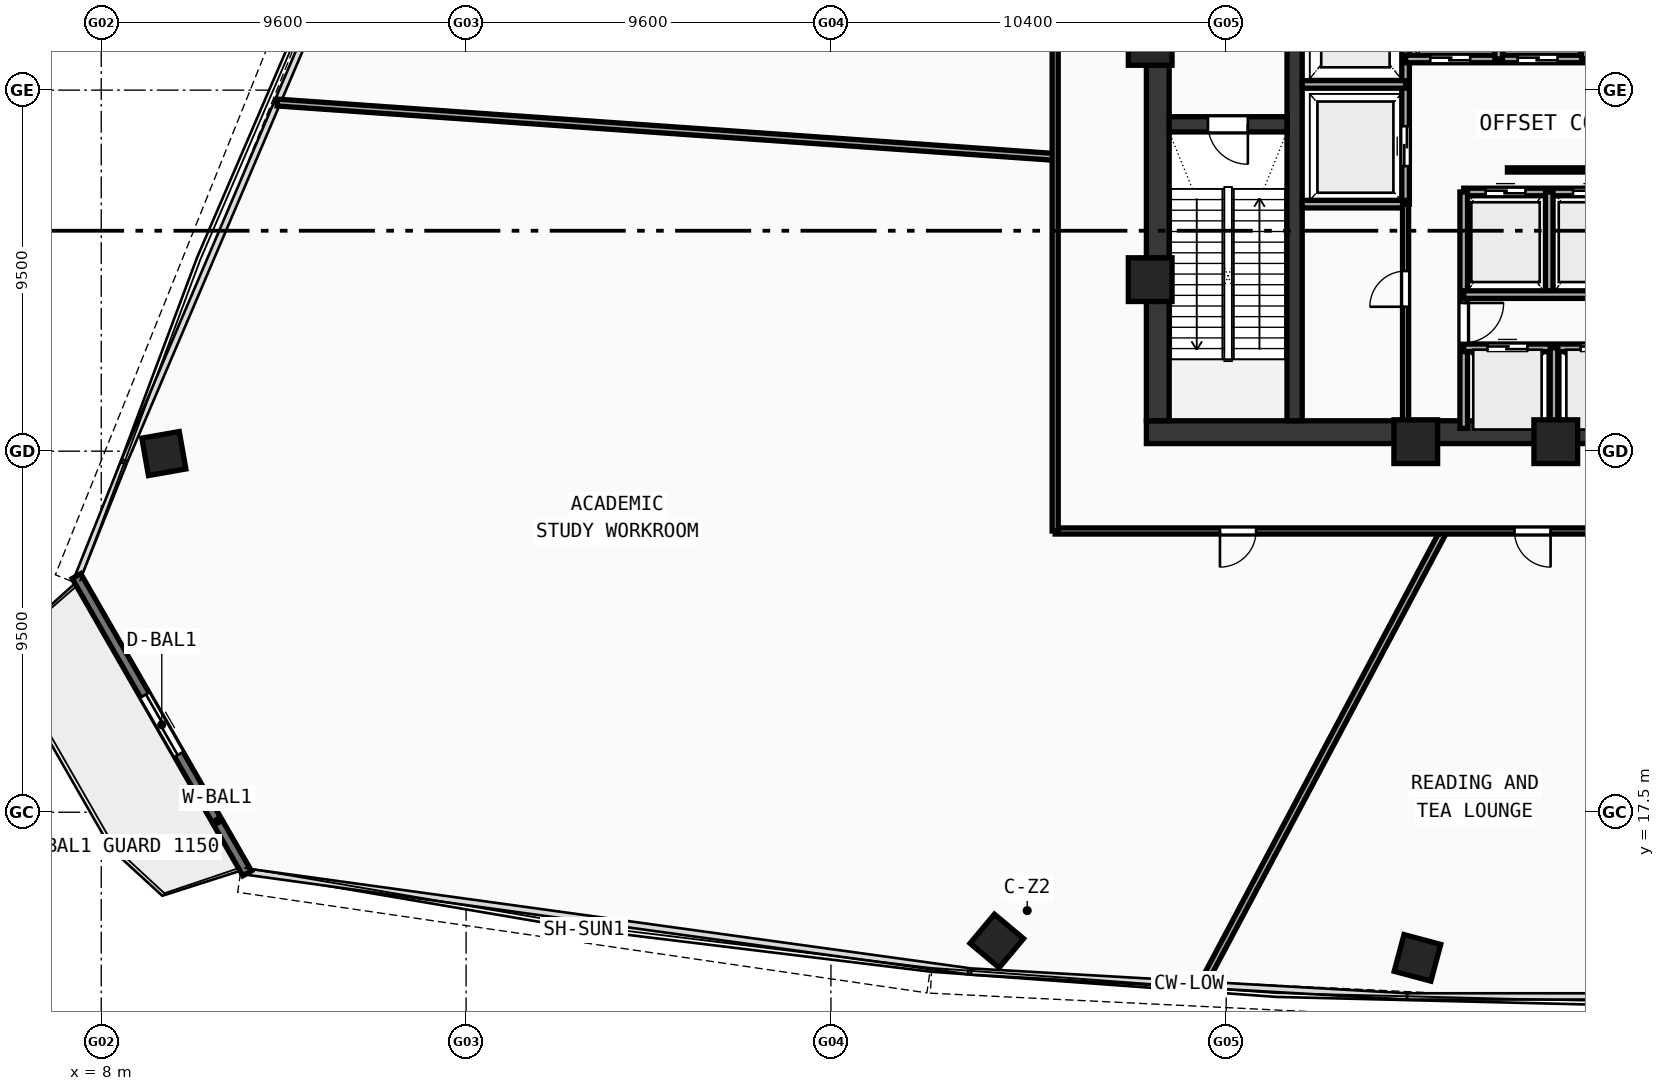
"""IFC4 building model, lengths in metres.
Left out: names, types, materials, properties, quantities, classifications, styles, units other than length and angle.
Written with IfcOpenShell. Run it as: python <this file> out.ifc"""

import sys

from ifc_helpers import new_model, si_unit, direction, frame, frame_2d, origin, origin_with_axes, origin_2d, place, context, subcontext, project, spatial, rectangle, hollow_rectangle, extrude, source, transform, mapped, element, fill, save


model = new_model("IFC4")
c1 = context("Model", 3, precision=1e-05, world=origin(), true_north=direction((0.0, 1.0)))
c2 = subcontext(c1, "Body", "Model", "MODEL_VIEW")
j1 = project(units=[si_unit("LENGTHUNIT", "METRE"), si_unit("PLANEANGLEUNIT", "RADIAN")], contexts=[c1])
p1 = place(None, origin())
s1 = spatial("IfcSite", under=j1, at=p1, CompositionType="ELEMENT")
p2 = place(p1, origin())
s2 = spatial("IfcBuilding", under=s1, at=p2, CompositionType="ELEMENT")
p3 = place(p2, frame((0.0, 0.0, 119.18)))
s3 = spatial("IfcBuildingStorey", under=s2, at=p3, CompositionType="ELEMENT", Elevation=119.18)
p4 = place(p3, frame((35.5, 27.5, 0.0), z_axis=(0.0, 0.0, 1.0), x_axis=(1.0, 0.0, 0.0)))
e1 = element("IfcWall", 1, at=p4, inside=s3, PredefinedType="SHEAR", context=c2, shape_type="SweptSolid", body=[
    extrude(rectangle(XDim=25.0, YDim=0.6, at=frame_2d((12.5, 0.0))), origin(), (0.0, 0.0, 1.0), 5.57),
])
p5 = place(p3, frame((35.8, 27.8, 0.0), z_axis=(0.0, 0.0, 1.0), x_axis=(0.0, 1.0, 0.0)))
e2 = element("IfcWall", 2, at=p5, inside=s3, PredefinedType="SHEAR", context=c2, shape_type="SweptSolid", body=[
    extrude(rectangle(XDim=12.1, YDim=0.6, at=frame_2d((6.05, 0.0))), origin(), (0.0, 0.0, 1.0), 5.57),
])
p6 = place(p3, frame((39.4, 27.8, 0.0), z_axis=(0.0, 0.0, 1.0), x_axis=(0.0, 1.0, 0.0)))
e3 = element("IfcWall", 3, at=p6, inside=s3, PredefinedType="SHEAR", context=c2, shape_type="SweptSolid", body=[
    extrude(rectangle(XDim=12.1, YDim=0.4, at=frame_2d((6.05, 0.0))), origin(), (0.0, 0.0, 1.0), 5.57),
])
p7 = place(p6, frame((9.95, 0.0, 0.0)))
e4 = element("IfcOpeningElement", 4, at=p7, cuts=e3, PredefinedType="OPENING", context=c2, shape_type="SweptSolid", body=[
    extrude(rectangle(XDim=1.1, YDim=2.1, at=frame_2d((0.55, 1.05))), frame((0.0, 0.21, 0.0), z_axis=(0.0, -1.0, 0.0), x_axis=(1.0, 0.0, 0.0)), (0.0, 0.0, 1.0), 0.42),
])
p8 = place(p3, frame((36.1, 35.6, 0.0), z_axis=(0.0, 0.0, 1.0), x_axis=(1.0, 0.0, 0.0)))
e5 = element("IfcWall", 5, at=p8, inside=s3, PredefinedType="SHEAR", context=c2, shape_type="SweptSolid", body=[
    extrude(rectangle(XDim=3.1, YDim=0.4, at=frame_2d((1.55, 0.0))), origin(), (0.0, 0.0, 1.0), 5.57),
])
p9 = place(p8, frame((1.02, 0.0, 0.0)))
e6 = element("IfcOpeningElement", 6, at=p9, cuts=e5, PredefinedType="OPENING", context=c2, shape_type="SweptSolid", body=[
    extrude(rectangle(XDim=1.05, YDim=2.1, at=frame_2d((0.525, 1.05))), frame((0.0, 0.21, 0.0), z_axis=(0.0, -1.0, 0.0), x_axis=(1.0, 0.0, 0.0)), (0.0, 0.0, 1.0), 0.42),
])
m1 = source(origin(), c2, "Body", "SweptSolid", [
    extrude(hollow_rectangle(XDim=1.15, YDim=1.15, WallThickness=0.048, at=origin_2d()), origin(), (0.0, 0.0, 1.0), 5.85),
])
for number, where, z_axis, x_axis in (
    (7, (42.588, 27.25, -0.28), (0.0, 0.0, 1.0), (1.0, 0.0, 0.0)),
    (8, (46.272, 27.25, -0.28), (0.0, 0.0, 1.0), (1.0, 0.0, 0.0)),
    (9, (35.6, 37.729, -0.28), (0.0, 0.0, 1.0), (1.0, 0.0, 0.0)),
    (10, (35.6, 31.513, -0.28), (0.0, 0.0, 1.0), (1.0, 0.0, 0.0)),
):
    element("IfcColumn", number, at=place(p3, frame(where, z_axis=z_axis, x_axis=x_axis)), inside=s3, PredefinedType="COLUMN", context=c2, shape_type="MappedRepresentation", body=[
        mapped(m1, transform((0.0, 0.0, 0.0), scale=1.0)),
    ])
m2 = source(origin(), c2, "Body", "SweptSolid", [
    extrude(hollow_rectangle(XDim=1.0, YDim=1.0, WallThickness=0.042, at=origin_2d()), origin(), (0.0, 0.0, 1.0), 5.85),
])
for number, where, z_axis, x_axis in (
    (11, (31.564, 14.112, -0.28), (0.0, 0.0, 1.0), (0.766, -0.643, 0.0)),
    (12, (42.633, 13.668, -0.28), (0.0, 0.0, 1.0), (0.966, -0.259, 0.0)),
    (13, (9.647, 26.938, -0.28), (0.0, 0.0, 1.0), (0.174, -0.985, 0.0)),
):
    element("IfcColumn", number, at=place(p3, frame(where, z_axis=z_axis, x_axis=x_axis)), inside=s3, PredefinedType="COLUMN", context=c2, shape_type="MappedRepresentation", body=[
        mapped(m2, transform((0.0, 0.0, 0.0), scale=1.0)),
    ])
p10 = place(p3, frame((7.347, 23.714, 0.0), z_axis=(0.0, 0.0, 1.0), x_axis=(0.497936512869, -0.867213485338, 0.0)))
e14 = element("IfcWall", 14, at=p10, inside=s3, PredefinedType="STANDARD", context=c2, shape_type="SweptSolid", body=[
    extrude(rectangle(XDim=9.019, YDim=0.26, at=frame_2d((4.51, 0.0))), origin(), (0.0, 0.0, 1.0), 5.57),
])
p11 = place(p10, frame((3.61, 0.0, 0.0)))
e15 = element("IfcOpeningElement", 15, at=p11, cuts=e14, PredefinedType="OPENING", context=c2, shape_type="SweptSolid", body=[
    extrude(rectangle(XDim=1.8, YDim=2.15, at=frame_2d((0.9, 1.075))), frame((0.0, 0.14, 0.0), z_axis=(0.0, -1.0, 0.0), x_axis=(1.0, 0.0, 0.0)), (0.0, 0.0, 1.0), 0.28),
])
p12 = place(p3, frame((42.32, 33.5, 0.0), z_axis=(0.0, 0.0, 1.0), x_axis=(0.0, 1.0, 0.0)))
e16 = element("IfcWall", 16, at=p12, inside=s3, PredefinedType="SOLIDWALL", context=c2, shape_type="SweptSolid", body=[
    extrude(rectangle(XDim=6.45, YDim=0.2, at=frame_2d((3.225, 0.0))), origin(), (0.0, 0.0, 1.0), 5.57),
])
p13 = place(p12, frame((1.0, 0.0, 0.0)))
e17 = element("IfcOpeningElement", 17, at=p13, cuts=e16, PredefinedType="OPENING", context=c2, shape_type="SweptSolid", body=[
    extrude(rectangle(XDim=1.05, YDim=2.1, at=frame_2d((0.525, 1.05))), frame((0.0, 0.11, 0.0), z_axis=(0.0, -1.0, 0.0), x_axis=(1.0, 0.0, 0.0)), (0.0, 0.0, 1.0), 0.22),
])
for number, where, z_axis, x_axis in (
    (18, (39.6, 36.65, 0.0), (0.0, 0.0, 1.0), (1.0, 0.0, 0.0)),
    (19, (39.6, 33.5, 0.0), (0.0, 0.0, 1.0), (1.0, 0.0, 0.0)),
):
    element("IfcWall", number, at=place(p3, frame(where, z_axis=z_axis, x_axis=x_axis)), inside=s3, PredefinedType="SOLIDWALL", context=c2, shape_type="SweptSolid", body=[
        extrude(rectangle(XDim=2.72, YDim=0.2, at=frame_2d((1.36, 0.0))), origin(), (0.0, 0.0, 1.0), 5.57),
    ])
p14 = place(p3, frame((42.32, 37.32, 0.0), z_axis=(0.0, 0.0, 1.0), x_axis=(1.0, 0.0, 0.0)))
e20 = element("IfcWall", 20, at=p14, inside=s3, PredefinedType="SOLIDWALL", context=c2, shape_type="SweptSolid", body=[
    extrude(rectangle(XDim=4.73, YDim=0.2, at=frame_2d((2.365, 0.0))), origin(), (0.0, 0.0, 1.0), 5.57),
])
p15 = place(p14, frame((0.65, 0.0, 0.0)))
e21 = element("IfcOpeningElement", 21, at=p15, cuts=e20, PredefinedType="OPENING", context=c2, shape_type="SweptSolid", body=[
    extrude(rectangle(XDim=1.05, YDim=2.1, at=frame_2d((0.525, 1.05))), frame((0.0, 0.11, 0.0), z_axis=(0.0, -1.0, 0.0), x_axis=(1.0, 0.0, 0.0)), (0.0, 0.0, 1.0), 0.22),
])
p16 = place(p14, frame((2.95, 0.0, 0.0)))
e22 = element("IfcOpeningElement", 22, at=p16, cuts=e20, PredefinedType="OPENING", context=c2, shape_type="SweptSolid", body=[
    extrude(rectangle(XDim=1.05, YDim=2.1, at=frame_2d((0.525, 1.05))), frame((0.0, 0.11, 0.0), z_axis=(0.0, -1.0, 0.0), x_axis=(1.0, 0.0, 0.0)), (0.0, 0.0, 1.0), 0.22),
])
p17 = place(p3, frame((47.05, 37.32, 0.0), z_axis=(0.0, 0.0, 1.0), x_axis=(0.0, 1.0, 0.0)))
e23 = element("IfcWall", 23, at=p17, inside=s3, PredefinedType="SOLIDWALL", context=c2, shape_type="SweptSolid", body=[
    extrude(rectangle(XDim=2.63, YDim=0.2, at=frame_2d((1.315, 0.0))), origin(), (0.0, 0.0, 1.0), 5.57),
])
p18 = place(p3, frame((44.77, 37.32, 0.0), z_axis=(0.0, 0.0, 1.0), x_axis=(0.0, 1.0, 0.0)))
e24 = element("IfcWall", 24, at=p18, inside=s3, PredefinedType="SOLIDWALL", context=c2, shape_type="SweptSolid", body=[
    extrude(rectangle(XDim=2.63, YDim=0.2, at=frame_2d((1.315, 0.0))), origin(), (0.0, 0.0, 1.0), 2.22),
])
p19 = place(p3, frame((43.85, 33.82, 0.0), z_axis=(0.0, 0.0, 1.0), x_axis=(1.0, 0.0, 0.0)))
e25 = element("IfcWall", 25, at=p19, inside=s3, PredefinedType="SOLIDWALL", context=c2, shape_type="SweptSolid", body=[
    extrude(rectangle(XDim=9.83, YDim=0.2, at=frame_2d((4.915, 0.0))), origin(), (0.0, 0.0, 1.0), 5.57),
])
p20 = place(p19, frame((0.575, 0.0, 0.0)))
e26 = element("IfcOpeningElement", 26, at=p20, cuts=e25, PredefinedType="OPENING", context=c2, shape_type="SweptSolid", body=[
    extrude(rectangle(XDim=1.05, YDim=2.1, at=frame_2d((0.525, 1.05))), frame((0.0, 0.11, 0.0), z_axis=(0.0, -1.0, 0.0), x_axis=(1.0, 0.0, 0.0)), (0.0, 0.0, 1.0), 0.22),
])
p21 = place(p19, frame((2.875, 0.0, 0.0)))
e27 = element("IfcOpeningElement", 27, at=p21, cuts=e25, PredefinedType="OPENING", context=c2, shape_type="SweptSolid", body=[
    extrude(rectangle(XDim=1.05, YDim=2.1, at=frame_2d((0.525, 1.05))), frame((0.0, 0.11, 0.0), z_axis=(0.0, -1.0, 0.0), x_axis=(1.0, 0.0, 0.0)), (0.0, 0.0, 1.0), 0.22),
])
p22 = place(p19, frame((5.175, 0.0, 0.0)))
e28 = element("IfcOpeningElement", 28, at=p22, cuts=e25, PredefinedType="OPENING", context=c2, shape_type="SweptSolid", body=[
    extrude(rectangle(XDim=1.05, YDim=2.1, at=frame_2d((0.525, 1.05))), frame((0.0, 0.11, 0.0), z_axis=(0.0, -1.0, 0.0), x_axis=(1.0, 0.0, 0.0)), (0.0, 0.0, 1.0), 0.22),
])
p23 = place(p19, frame((7.475, 0.0, 0.0)))
e29 = element("IfcOpeningElement", 29, at=p23, cuts=e25, PredefinedType="OPENING", context=c2, shape_type="SweptSolid", body=[
    extrude(rectangle(XDim=1.05, YDim=2.1, at=frame_2d((0.525, 1.05))), frame((0.0, 0.11, 0.0), z_axis=(0.0, -1.0, 0.0), x_axis=(1.0, 0.0, 0.0)), (0.0, 0.0, 1.0), 0.22),
])
p24 = place(p3, frame((43.85, 27.6, 0.0), z_axis=(0.0, 0.0, 1.0), x_axis=(0.0, 1.0, 0.0)))
e30 = element("IfcWall", 30, at=p24, inside=s3, PredefinedType="SOLIDWALL", context=c2, shape_type="SweptSolid", body=[
    extrude(rectangle(XDim=6.22, YDim=0.2, at=frame_2d((3.11, 0.0))), origin(), (0.0, 0.0, 1.0), 5.57),
])
p25 = place(p24, frame((2.25, 0.0, 0.0)))
e31 = element("IfcOpeningElement", 31, at=p25, cuts=e30, PredefinedType="OPENING", context=c2, shape_type="SweptSolid", body=[
    extrude(rectangle(XDim=1.05, YDim=2.1, at=frame_2d((0.525, 1.05))), frame((0.0, 0.11, 0.0), z_axis=(0.0, -1.0, 0.0), x_axis=(1.0, 0.0, 0.0)), (0.0, 0.0, 1.0), 0.22),
])
p26 = place(p3, frame((46.1, 31.12, 0.0), z_axis=(0.0, 0.0, 1.0), x_axis=(0.0, 1.0, 0.0)))
e32 = element("IfcWall", 32, at=p26, inside=s3, PredefinedType="SOLIDWALL", context=c2, shape_type="SweptSolid", body=[
    extrude(rectangle(XDim=2.7, YDim=0.2, at=frame_2d((1.35, 0.0))), origin(), (0.0, 0.0, 1.0), 5.57),
])
p27 = place(p3, frame((43.85, 29.72, 0.0), z_axis=(0.0, 0.0, 1.0), x_axis=(1.0, 0.0, 0.0)))
e33 = element("IfcWall", 33, at=p27, inside=s3, PredefinedType="SOLIDWALL", context=c2, shape_type="SweptSolid", body=[
    extrude(rectangle(XDim=7.2, YDim=0.2, at=frame_2d((3.6, 0.0))), origin(), (0.0, 0.0, 1.0), 5.57),
])
p28 = place(p27, frame((0.625, 0.0, 0.0)))
e34 = element("IfcOpeningElement", 34, at=p28, cuts=e33, PredefinedType="OPENING", context=c2, shape_type="SweptSolid", body=[
    extrude(rectangle(XDim=1.05, YDim=2.1, at=frame_2d((0.525, 1.05))), frame((0.0, 0.11, 0.0), z_axis=(0.0, -1.0, 0.0), x_axis=(1.0, 0.0, 0.0)), (0.0, 0.0, 1.0), 0.22),
])
p29 = place(p27, frame((3.075, 0.0, 0.0)))
e35 = element("IfcOpeningElement", 35, at=p29, cuts=e33, PredefinedType="OPENING", context=c2, shape_type="SweptSolid", body=[
    extrude(rectangle(XDim=1.05, YDim=2.1, at=frame_2d((0.525, 1.05))), frame((0.0, 0.11, 0.0), z_axis=(0.0, -1.0, 0.0), x_axis=(1.0, 0.0, 0.0)), (0.0, 0.0, 1.0), 0.22),
])
p30 = place(p27, frame((5.525, 0.0, 0.0)))
e36 = element("IfcOpeningElement", 36, at=p30, cuts=e33, PredefinedType="OPENING", context=c2, shape_type="SweptSolid", body=[
    extrude(rectangle(XDim=1.05, YDim=2.1, at=frame_2d((0.525, 1.05))), frame((0.0, 0.11, 0.0), z_axis=(0.0, -1.0, 0.0), x_axis=(1.0, 0.0, 0.0)), (0.0, 0.0, 1.0), 0.22),
])
p31 = place(p3, frame((43.85, 31.12, 0.0), z_axis=(0.0, 0.0, 1.0), x_axis=(1.0, 0.0, 0.0)))
e37 = element("IfcWall", 37, at=p31, inside=s3, PredefinedType="SOLIDWALL", context=c2, shape_type="SweptSolid", body=[
    extrude(rectangle(XDim=9.83, YDim=0.2, at=frame_2d((4.915, 0.0))), origin(), (0.0, 0.0, 1.0), 5.57),
])
p32 = place(p3, frame((46.225, 27.6, 0.0), z_axis=(0.0, 0.0, 1.0), x_axis=(0.0, 1.0, 0.0)))
e38 = element("IfcWall", 38, at=p32, inside=s3, PredefinedType="SOLIDWALL", context=c2, shape_type="SweptSolid", body=[
    extrude(rectangle(XDim=2.12, YDim=0.2, at=frame_2d((1.06, 0.0))), origin(), (0.0, 0.0, 1.0), 2.22),
])
p33 = place(p3, frame((42.32, 27.6, 0.0), z_axis=(0.0, 0.0, 1.0), x_axis=(0.0, 1.0, 0.0)))
e39 = element("IfcWall", 39, at=p33, inside=s3, PredefinedType="PARTITIONING", context=c2, shape_type="SweptSolid", body=[
    extrude(rectangle(XDim=5.9, YDim=0.16, at=frame_2d((2.95, 0.0))), origin(), (0.0, 0.0, 1.0), 2.22),
])
p34 = place(p33, frame((3.2, 0.0, 0.0)))
e40 = element("IfcOpeningElement", 40, at=p34, cuts=e39, PredefinedType="OPENING", context=c2, shape_type="SweptSolid", body=[
    extrude(rectangle(XDim=0.94, YDim=2.1, at=frame_2d((0.47, 1.05))), frame((0.0, 0.09, 0.0), z_axis=(0.0, -1.0, 0.0), x_axis=(1.0, 0.0, 0.0)), (0.0, 0.0, 1.0), 0.18),
])
p35 = place(p3, frame((33.1, 34.742, 0.0), z_axis=(0.0, 0.0, 1.0), x_axis=(-0.99756459993, 0.069748612653, 0.0)))
e41 = element("IfcWall", 41, at=p35, inside=s3, PredefinedType="PARTITIONING", context=c2, shape_type="SweptSolid", body=[
    extrude(rectangle(XDim=20.519, YDim=0.18, at=frame_2d((10.259, 0.0))), origin(), (0.0, 0.0, 1.0), 4.87),
])
p36 = place(p3, frame((43.321, 24.9, 0.0), z_axis=(0.0, 0.0, 1.0), x_axis=(-0.46948390868, -0.88294102832, 0.0)))
e42 = element("IfcWall", 42, at=p36, inside=s3, PredefinedType="PARTITIONING", context=c2, shape_type="SweptSolid", body=[
    extrude(rectangle(XDim=13.521, YDim=0.18, at=frame_2d((6.761, 0.0))), origin(), (0.0, 0.0, 1.0), 4.87),
])
p37 = place(p3, frame((62.9, 24.9, 0.0), z_axis=(0.0, 0.0, 1.0), x_axis=(-1.0, 0.0, 0.0)))
e43 = element("IfcWall", 43, at=p37, inside=s3, PredefinedType="PARTITIONING", context=c2, shape_type="SweptSolid", body=[
    extrude(rectangle(XDim=29.8, YDim=0.16, at=frame_2d((14.9, 0.0))), origin(), (0.0, 0.0, 1.0), 2.22),
])
p38 = place(p37, frame((24.514, 0.0, 0.0)))
e44 = element("IfcOpeningElement", 44, at=p38, cuts=e43, PredefinedType="OPENING", context=c2, shape_type="SweptSolid", body=[
    extrude(rectangle(XDim=0.95, YDim=2.1, at=frame_2d((0.475, 1.05))), frame((0.0, 0.09, 0.0), z_axis=(0.0, -1.0, 0.0), x_axis=(1.0, 0.0, 0.0)), (0.0, 0.0, 1.0), 0.18),
])
p39 = place(p37, frame((16.764, 0.0, 0.0)))
e45 = element("IfcOpeningElement", 45, at=p39, cuts=e43, PredefinedType="OPENING", context=c2, shape_type="SweptSolid", body=[
    extrude(rectangle(XDim=0.95, YDim=2.1, at=frame_2d((0.475, 1.05))), frame((0.0, 0.09, 0.0), z_axis=(0.0, -1.0, 0.0), x_axis=(1.0, 0.0, 0.0)), (0.0, 0.0, 1.0), 0.18),
])
p40 = place(p37, frame((8.793, 0.0, 0.0)))
e46 = element("IfcOpeningElement", 46, at=p40, cuts=e43, PredefinedType="OPENING", context=c2, shape_type="SweptSolid", body=[
    extrude(rectangle(XDim=0.95, YDim=2.1, at=frame_2d((0.475, 1.05))), frame((0.0, 0.09, 0.0), z_axis=(0.0, -1.0, 0.0), x_axis=(1.0, 0.0, 0.0)), (0.0, 0.0, 1.0), 0.18),
])
p41 = place(p3, frame((33.1, 24.9, 0.0), z_axis=(0.0, 0.0, 1.0), x_axis=(0.0, 1.0, 0.0)))
e47 = element("IfcWall", 47, at=p41, inside=s3, PredefinedType="PARTITIONING", context=c2, shape_type="SweptSolid", body=[
    extrude(rectangle(XDim=17.35, YDim=0.16, at=frame_2d((8.675, 0.0))), origin(), (0.0, 0.0, 1.0), 2.22),
])
p42 = place(p3, frame((45.0, 34.4, 0.0), z_axis=(0.0, 0.0, 1.0), x_axis=(1.0, 0.0, 0.0)))
e48 = element("IfcWall", 48, at=p42, inside=s3, PredefinedType="MOVABLE", context=c2, shape_type="SweptSolid", body=[
    extrude(rectangle(XDim=6.0, YDim=0.11, at=frame_2d((3.0, 0.0))), origin(), (0.0, 0.0, 1.0), 2.5),
])
m3 = source(origin(), c2, "Body", "SweptSolid", [
    extrude(rectangle(XDim=1.8, YDim=2.15, at=frame_2d((0.9, 1.075))), frame((0.0, 0.025, 0.0), z_axis=(0.0, -1.0, 0.0), x_axis=(1.0, 0.0, 0.0)), (0.0, 0.0, 1.0), 0.05),
])
p43 = place(p11, origin_with_axes())
e49 = element("IfcDoor", 49, at=p43, inside=s3, OperationType="DOUBLE_DOOR_SLIDING", PredefinedType="DOOR", context=c2, shape_type="MappedRepresentation", body=[
    mapped(m3, transform((0.0, 0.0, 0.0), scale=1.0)),
])
fill(e15, e49)
m4 = source(origin(), c2, "Body", "SweptSolid", [
    extrude(rectangle(XDim=1.05, YDim=2.1, at=frame_2d((0.525, 1.05))), frame((0.0, 0.025, 0.0), z_axis=(0.0, -1.0, 0.0), x_axis=(1.0, 0.0, 0.0)), (0.0, 0.0, 1.0), 0.05),
])
p44 = place(p9, frame((1.05, 0.0, 0.0), z_axis=(0.0, 0.0, 1.0), x_axis=(-1.0, 0.0, 0.0)))
e50 = element("IfcDoor", 50, at=p44, inside=s3, OperationType="SINGLE_SWING_LEFT", PredefinedType="DOOR", context=c2, shape_type="MappedRepresentation", body=[
    mapped(m4, transform((0.0, 0.0, 0.0), scale=1.0)),
])
fill(e6, e50)
p45 = place(p13, origin_with_axes())
e51 = element("IfcDoor", 51, at=p45, inside=s3, OperationType="DOUBLE_DOOR_SLIDING", PredefinedType="DOOR", context=c2, shape_type="MappedRepresentation", body=[
    mapped(m4, transform((0.0, 0.0, 0.0), scale=1.0)),
])
fill(e17, e51)
p46 = place(p15, frame((1.05, 0.0, 0.0), z_axis=(0.0, 0.0, 1.0), x_axis=(-1.0, 0.0, 0.0)))
e52 = element("IfcDoor", 52, at=p46, inside=s3, OperationType="DOUBLE_DOOR_SLIDING", PredefinedType="DOOR", context=c2, shape_type="MappedRepresentation", body=[
    mapped(m4, transform((0.0, 0.0, 0.0), scale=1.0)),
])
fill(e21, e52)
p47 = place(p16, frame((1.05, 0.0, 0.0), z_axis=(0.0, 0.0, 1.0), x_axis=(-1.0, 0.0, 0.0)))
e53 = element("IfcDoor", 53, at=p47, inside=s3, OperationType="DOUBLE_DOOR_SLIDING", PredefinedType="DOOR", context=c2, shape_type="MappedRepresentation", body=[
    mapped(m4, transform((0.0, 0.0, 0.0), scale=1.0)),
])
fill(e22, e53)
p48 = place(p20, origin_with_axes())
e54 = element("IfcDoor", 54, at=p48, inside=s3, OperationType="DOUBLE_DOOR_SLIDING", PredefinedType="DOOR", context=c2, shape_type="MappedRepresentation", body=[
    mapped(m4, transform((0.0, 0.0, 0.0), scale=1.0)),
])
fill(e26, e54)
p49 = place(p21, origin_with_axes())
e55 = element("IfcDoor", 55, at=p49, inside=s3, OperationType="DOUBLE_DOOR_SLIDING", PredefinedType="DOOR", context=c2, shape_type="MappedRepresentation", body=[
    mapped(m4, transform((0.0, 0.0, 0.0), scale=1.0)),
])
fill(e27, e55)
p50 = place(p25, frame((1.05, 0.0, 0.0), z_axis=(0.0, 0.0, 1.0), x_axis=(-1.0, 0.0, 0.0)))
e56 = element("IfcDoor", 56, at=p50, inside=s3, OperationType="SINGLE_SWING_LEFT", PredefinedType="DOOR", context=c2, shape_type="MappedRepresentation", body=[
    mapped(m4, transform((0.0, 0.0, 0.0), scale=1.0)),
])
fill(e31, e56)
p51 = place(p28, origin_with_axes())
e57 = element("IfcDoor", 57, at=p51, inside=s3, OperationType="DOUBLE_DOOR_SLIDING", PredefinedType="DOOR", context=c2, shape_type="MappedRepresentation", body=[
    mapped(m4, transform((0.0, 0.0, 0.0), scale=1.0)),
])
fill(e34, e57)
p52 = place(p29, origin_with_axes())
e58 = element("IfcDoor", 58, at=p52, inside=s3, OperationType="DOUBLE_DOOR_SLIDING", PredefinedType="DOOR", context=c2, shape_type="MappedRepresentation", body=[
    mapped(m4, transform((0.0, 0.0, 0.0), scale=1.0)),
])
fill(e35, e58)
m5 = source(origin(), c2, "Body", "SweptSolid", [
    extrude(rectangle(XDim=0.94, YDim=2.1, at=frame_2d((0.47, 1.05))), frame((0.0, 0.025, 0.0), z_axis=(0.0, -1.0, 0.0), x_axis=(1.0, 0.0, 0.0)), (0.0, 0.0, 1.0), 0.05),
])
p53 = place(p34, origin_with_axes())
e59 = element("IfcDoor", 59, at=p53, inside=s3, OperationType="SINGLE_SWING_LEFT", PredefinedType="DOOR", context=c2, shape_type="MappedRepresentation", body=[
    mapped(m5, transform((0.0, 0.0, 0.0), scale=1.0)),
])
fill(e40, e59)
m6 = source(origin(), c2, "Body", "SweptSolid", [
    extrude(rectangle(XDim=0.95, YDim=2.1, at=frame_2d((0.475, 1.05))), frame((0.0, 0.025, 0.0), z_axis=(0.0, -1.0, 0.0), x_axis=(1.0, 0.0, 0.0)), (0.0, 0.0, 1.0), 0.05),
])
p54 = place(p38, origin_with_axes())
e60 = element("IfcDoor", 60, at=p54, inside=s3, OperationType="SINGLE_SWING_RIGHT", PredefinedType="DOOR", context=c2, shape_type="MappedRepresentation", body=[
    mapped(m6, transform((0.0, 0.0, 0.0), scale=1.0)),
])
fill(e44, e60)
p55 = place(p39, origin_with_axes())
e61 = element("IfcDoor", 61, at=p55, inside=s3, OperationType="SINGLE_SWING_LEFT", PredefinedType="DOOR", context=c2, shape_type="MappedRepresentation", body=[
    mapped(m6, transform((0.0, 0.0, 0.0), scale=1.0)),
])
fill(e45, e61)
save(model, sys.argv[1])
